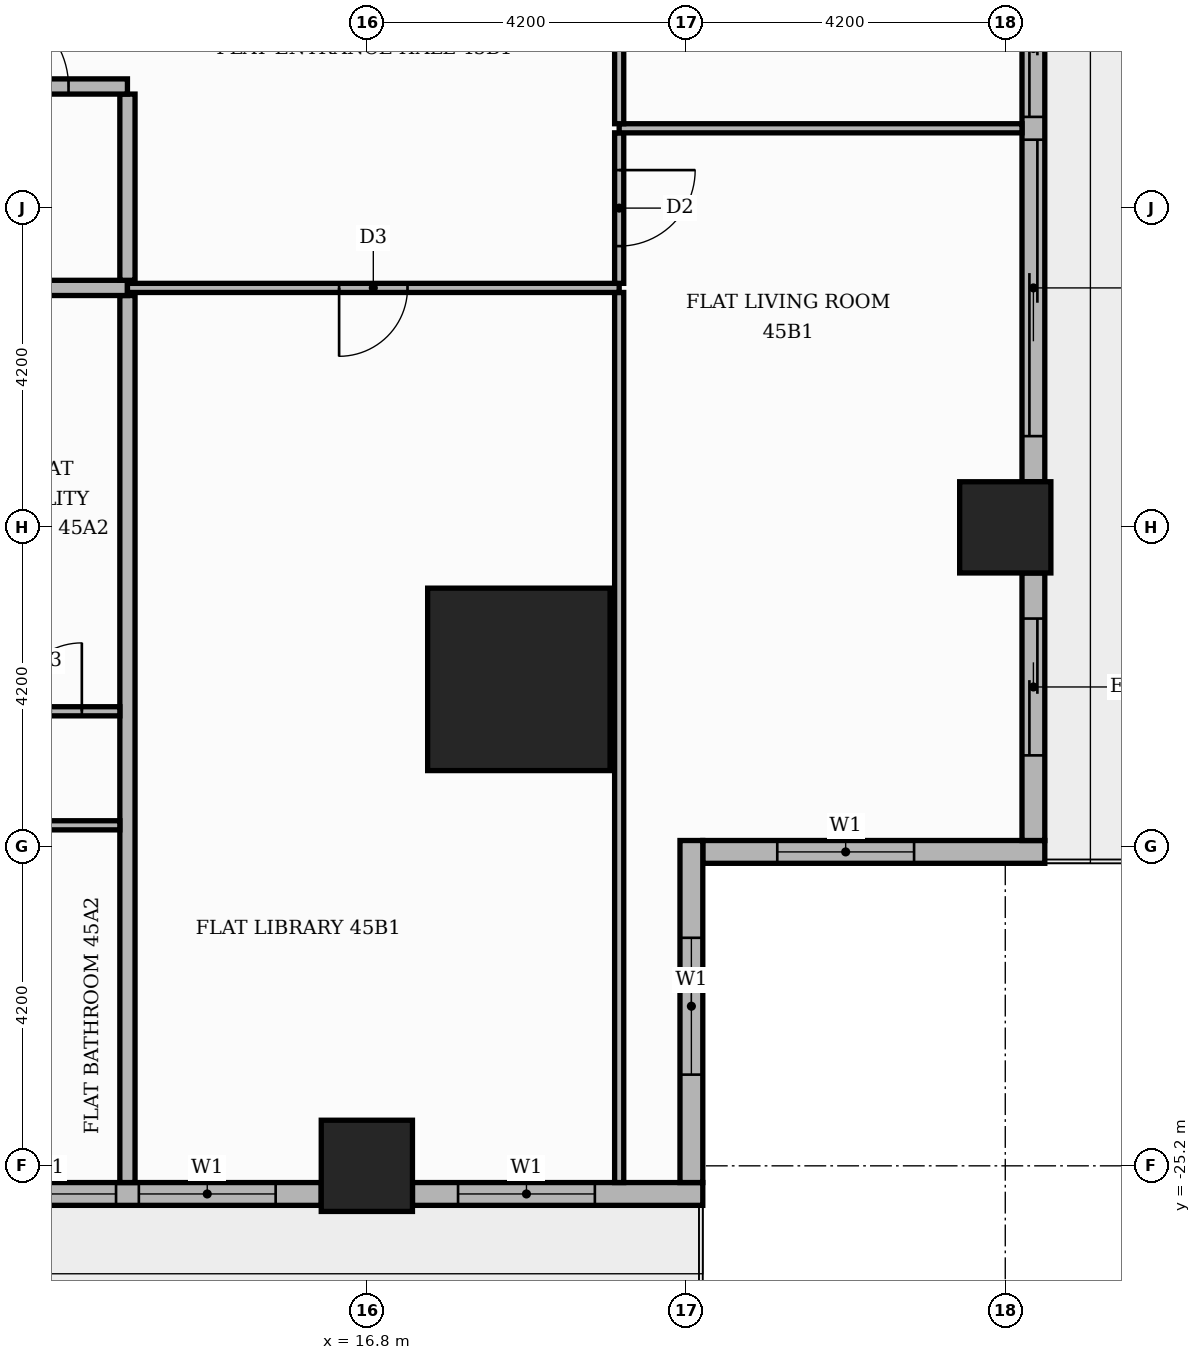
"""IFC4 building model, lengths in metres.
Left out: names, types, materials, properties, quantities, classifications, styles, units other than length and angle.
Written with IfcOpenShell. Run it as: python <this file> out.ifc"""

import sys

from ifc_helpers import new_model, si_unit, direction, frame, frame_2d, origin, origin_2d, place, context, subcontext, project, spatial, rectangle, extrude, element, fill, save


model = new_model("IFC4")
c1 = context("Model", 3, precision=1e-05, world=origin(), true_north=direction((0.0, 1.0)))
c2 = subcontext(c1, "Body", "Model", "MODEL_VIEW")
j1 = project(units=[si_unit("LENGTHUNIT", "METRE"), si_unit("PLANEANGLEUNIT", "RADIAN")], contexts=[c1])
p1 = place(None, origin())
s1 = spatial("IfcSite", under=j1, at=p1, CompositionType="ELEMENT")
p2 = place(p1, origin())
s2 = spatial("IfcBuilding", under=s1, at=p2, CompositionType="ELEMENT")
p3 = place(p2, frame((0.0, 0.0, 192.3)))
s3 = spatial("IfcBuildingStorey", under=s2, at=p3, CompositionType="ELEMENT", Elevation=192.3)
p4 = place(p3, frame((18.8, -18.8, 0.0), z_axis=(0.0, 0.0, 1.0), x_axis=(1.0, 0.0, 0.0)))
e1 = element("IfcColumn", 1, at=p4, inside=s3, PredefinedType="COLUMN", context=c2, shape_type="SweptSolid", body=[
    extrude(rectangle(XDim=2.4, YDim=2.4, at=origin_2d()), origin(), (0.0, 0.0, 1.0), 3.9),
])
for number, where, z_axis, x_axis in (
    (2, (25.2, -16.8, 0.0), (0.0, 0.0, 1.0), (1.0, 0.0, 0.0)),
    (3, (16.8, -25.2, 0.0), (0.0, 0.0, 1.0), (1.0, 0.0, 0.0)),
):
    element("IfcColumn", number, at=place(p3, frame(where, z_axis=z_axis, x_axis=x_axis)), inside=s3, PredefinedType="COLUMN", context=c2, shape_type="SweptSolid", body=[
        extrude(rectangle(XDim=1.2, YDim=1.2, at=origin_2d()), origin(), (0.0, 0.0, 1.0), 3.9),
    ])
p5 = place(p3, frame((21.22, -21.07, 0.0), z_axis=(0.0, 0.0, 1.0), x_axis=(1.0, 0.0, 0.0)))
e4 = element("IfcWall", 4, at=p5, inside=s3, PredefinedType="STANDARD", context=c2, shape_type="SweptSolid", body=[
    extrude(rectangle(XDim=4.5, YDim=0.3, at=frame_2d((2.25, 0.0))), origin(), (0.0, 0.0, 1.0), 3.48),
])
p6 = place(p5, frame((0.98, 0.0, 0.9)))
e5 = element("IfcOpeningElement", 5, at=p6, cuts=e4, PredefinedType="OPENING", context=c2, shape_type="SweptSolid", body=[
    extrude(rectangle(XDim=1.8, YDim=2.1, at=frame_2d((0.9, 1.05))), frame((0.0, 0.16, 0.0), z_axis=(0.0, -1.0, 0.0), x_axis=(1.0, 0.0, 0.0)), (0.0, 0.0, 1.0), 0.32),
])
p7 = place(p3, frame((25.57, -20.92, 0.0), z_axis=(0.0, 0.0, 1.0), x_axis=(0.0, 1.0, 0.0)))
e6 = element("IfcWall", 6, at=p7, inside=s3, PredefinedType="STANDARD", context=c2, shape_type="SweptSolid", body=[
    extrude(rectangle(XDim=3.52, YDim=0.3, at=frame_2d((1.76, 0.0))), origin(), (0.0, 0.0, 1.0), 3.48),
])
p8 = place(p7, frame((1.12, 0.0, 0.0)))
e7 = element("IfcOpeningElement", 7, at=p8, cuts=e6, PredefinedType="OPENING", context=c2, shape_type="SweptSolid", body=[
    extrude(rectangle(XDim=1.8, YDim=2.4, at=frame_2d((0.9, 1.2))), frame((0.0, 0.16, 0.0), z_axis=(0.0, -1.0, 0.0), x_axis=(1.0, 0.0, 0.0)), (0.0, 0.0, 1.0), 0.32),
])
p9 = place(p3, frame((25.57, -16.2, 0.0), z_axis=(0.0, 0.0, 1.0), x_axis=(0.0, 1.0, 0.0)))
e8 = element("IfcWall", 8, at=p9, inside=s3, PredefinedType="STANDARD", context=c2, shape_type="SweptSolid", body=[
    extrude(rectangle(XDim=7.2, YDim=0.3, at=frame_2d((3.6, 0.0))), origin(), (0.0, 0.0, 1.0), 3.48),
])
p10 = place(p9, frame((0.6, 0.0, 0.0)))
e9 = element("IfcOpeningElement", 9, at=p10, cuts=e8, PredefinedType="OPENING", context=c2, shape_type="SweptSolid", body=[
    extrude(rectangle(XDim=3.9, YDim=2.4, at=frame_2d((1.95, 1.2))), frame((0.0, 0.16, 0.0), z_axis=(0.0, -1.0, 0.0), x_axis=(1.0, 0.0, 0.0)), (0.0, 0.0, 1.0), 0.32),
])
p11 = place(p9, frame((4.8, 0.0, 0.0)))
e10 = element("IfcOpeningElement", 10, at=p11, cuts=e8, PredefinedType="OPENING", context=c2, shape_type="SweptSolid", body=[
    extrude(rectangle(XDim=1.8, YDim=2.4, at=frame_2d((0.9, 1.2))), frame((0.0, 0.16, 0.0), z_axis=(0.0, -1.0, 0.0), x_axis=(1.0, 0.0, 0.0)), (0.0, 0.0, 1.0), 0.32),
])
p12 = place(p3, frame((9.0, -25.57, 0.0), z_axis=(0.0, 0.0, 1.0), x_axis=(1.0, 0.0, 0.0)))
e11 = element("IfcWall", 11, at=p12, inside=s3, PredefinedType="STANDARD", context=c2, shape_type="SweptSolid", body=[
    extrude(rectangle(XDim=7.2, YDim=0.3, at=frame_2d((3.6, 0.0))), origin(), (0.0, 0.0, 1.0), 3.48),
])
p13 = place(p12, frame((0.6, 0.0, 0.9)))
e12 = element("IfcOpeningElement", 12, at=p13, cuts=e11, PredefinedType="OPENING", context=c2, shape_type="SweptSolid", body=[
    extrude(rectangle(XDim=1.8, YDim=2.1, at=frame_2d((0.9, 1.05))), frame((0.0, 0.16, 0.0), z_axis=(0.0, -1.0, 0.0), x_axis=(1.0, 0.0, 0.0)), (0.0, 0.0, 1.0), 0.32),
])
p14 = place(p12, frame((2.7, 0.0, 0.9)))
e13 = element("IfcOpeningElement", 13, at=p14, cuts=e11, PredefinedType="OPENING", context=c2, shape_type="SweptSolid", body=[
    extrude(rectangle(XDim=1.8, YDim=2.1, at=frame_2d((0.9, 1.05))), frame((0.0, 0.16, 0.0), z_axis=(0.0, -1.0, 0.0), x_axis=(1.0, 0.0, 0.0)), (0.0, 0.0, 1.0), 0.32),
])
p15 = place(p12, frame((4.8, 0.0, 0.9)))
e14 = element("IfcOpeningElement", 14, at=p15, cuts=e11, PredefinedType="OPENING", context=c2, shape_type="SweptSolid", body=[
    extrude(rectangle(XDim=1.8, YDim=2.1, at=frame_2d((0.9, 1.05))), frame((0.0, 0.16, 0.0), z_axis=(0.0, -1.0, 0.0), x_axis=(1.0, 0.0, 0.0)), (0.0, 0.0, 1.0), 0.32),
])
p16 = place(p3, frame((17.4, -25.57, 0.0), z_axis=(0.0, 0.0, 1.0), x_axis=(1.0, 0.0, 0.0)))
e15 = element("IfcWall", 15, at=p16, inside=s3, PredefinedType="STANDARD", context=c2, shape_type="SweptSolid", body=[
    extrude(rectangle(XDim=3.82, YDim=0.3, at=frame_2d((1.91, 0.0))), origin(), (0.0, 0.0, 1.0), 3.48),
])
p17 = place(p16, frame((0.6, 0.0, 0.9)))
e16 = element("IfcOpeningElement", 16, at=p17, cuts=e15, PredefinedType="OPENING", context=c2, shape_type="SweptSolid", body=[
    extrude(rectangle(XDim=1.8, YDim=2.1, at=frame_2d((0.9, 1.05))), frame((0.0, 0.16, 0.0), z_axis=(0.0, -1.0, 0.0), x_axis=(1.0, 0.0, 0.0)), (0.0, 0.0, 1.0), 0.32),
])
p18 = place(p3, frame((21.07, -25.42, 0.0), z_axis=(0.0, 0.0, 1.0), x_axis=(0.0, 1.0, 0.0)))
e17 = element("IfcWall", 17, at=p18, inside=s3, PredefinedType="STANDARD", context=c2, shape_type="SweptSolid", body=[
    extrude(rectangle(XDim=4.5, YDim=0.3, at=frame_2d((2.25, 0.0))), origin(), (0.0, 0.0, 1.0), 3.48),
])
p19 = place(p18, frame((1.42, 0.0, 0.9)))
e18 = element("IfcOpeningElement", 18, at=p19, cuts=e17, PredefinedType="OPENING", context=c2, shape_type="SweptSolid", body=[
    extrude(rectangle(XDim=1.8, YDim=2.1, at=frame_2d((0.9, 1.05))), frame((0.0, 0.16, 0.0), z_axis=(0.0, -1.0, 0.0), x_axis=(1.0, 0.0, 0.0)), (0.0, 0.0, 1.0), 0.32),
])
p20 = place(p3, frame((13.65, -25.42, 0.0), z_axis=(0.0, 0.0, 1.0), x_axis=(0.0, 1.0, 0.0)))
e19 = element("IfcWall", 19, at=p20, inside=s3, PredefinedType="PARTITIONING", context=c2, shape_type="SweptSolid", body=[
    extrude(rectangle(XDim=11.67, YDim=0.2, at=frame_2d((5.835, 0.0))), origin(), (0.0, 0.0, 1.0), 3.48),
])
p21 = place(p3, frame((20.12, -25.42, 0.0), z_axis=(0.0, 0.0, 1.0), x_axis=(0.0, 1.0, 0.0)))
e20 = element("IfcWall", 20, at=p21, inside=s3, PredefinedType="PARTITIONING", context=c2, shape_type="SweptSolid", body=[
    extrude(rectangle(XDim=11.71, YDim=0.12, at=frame_2d((5.855, 0.0))), origin(), (0.0, 0.0, 1.0), 3.48),
])
p22 = place(p3, frame((-5.15, -20.72, 0.0), z_axis=(0.0, 0.0, 1.0), x_axis=(1.0, 0.0, 0.0)))
e21 = element("IfcWall", 21, at=p22, inside=s3, PredefinedType="PARTITIONING", context=c2, shape_type="SweptSolid", body=[
    extrude(rectangle(XDim=18.7, YDim=0.12, at=frame_2d((9.35, 0.0))), origin(), (0.0, 0.0, 1.0), 3.48),
])
p23 = place(p22, frame((1.5, 0.0, 0.0)))
e22 = element("IfcOpeningElement", 22, at=p23, cuts=e21, PredefinedType="OPENING", context=c2, shape_type="SweptSolid", body=[
    extrude(rectangle(XDim=1.0, YDim=2.1, at=frame_2d((0.5, 1.05))), frame((0.0, 0.07, 0.0), z_axis=(0.0, -1.0, 0.0), x_axis=(1.0, 0.0, 0.0)), (0.0, 0.0, 1.0), 0.14),
])
p24 = place(p22, frame((5.75, 0.0, 0.0)))
e23 = element("IfcOpeningElement", 23, at=p24, cuts=e21, PredefinedType="OPENING", context=c2, shape_type="SweptSolid", body=[
    extrude(rectangle(XDim=0.9, YDim=2.1, at=frame_2d((0.45, 1.05))), frame((0.0, 0.07, 0.0), z_axis=(0.0, -1.0, 0.0), x_axis=(1.0, 0.0, 0.0)), (0.0, 0.0, 1.0), 0.14),
])
p25 = place(p22, frame((14.15, 0.0, 0.0)))
e24 = element("IfcOpeningElement", 24, at=p25, cuts=e21, PredefinedType="OPENING", context=c2, shape_type="SweptSolid", body=[
    extrude(rectangle(XDim=0.9, YDim=2.1, at=frame_2d((0.45, 1.05))), frame((0.0, 0.07, 0.0), z_axis=(0.0, -1.0, 0.0), x_axis=(1.0, 0.0, 0.0)), (0.0, 0.0, 1.0), 0.14),
])
p26 = place(p3, frame((3.15, -19.22, 0.0), z_axis=(0.0, 0.0, 1.0), x_axis=(1.0, 0.0, 0.0)))
e25 = element("IfcWall", 25, at=p26, inside=s3, PredefinedType="PARTITIONING", context=c2, shape_type="SweptSolid", body=[
    extrude(rectangle(XDim=10.4, YDim=0.12, at=frame_2d((5.2, 0.0))), origin(), (0.0, 0.0, 1.0), 3.48),
])
p27 = place(p26, frame((2.7, 0.0, 0.0)))
e26 = element("IfcOpeningElement", 26, at=p27, cuts=e25, PredefinedType="OPENING", context=c2, shape_type="SweptSolid", body=[
    extrude(rectangle(XDim=0.9, YDim=2.1, at=frame_2d((0.45, 1.05))), frame((0.0, 0.07, 0.0), z_axis=(0.0, -1.0, 0.0), x_axis=(1.0, 0.0, 0.0)), (0.0, 0.0, 1.0), 0.14),
])
p28 = place(p26, frame((6.9, 0.0, 0.0)))
e27 = element("IfcOpeningElement", 27, at=p28, cuts=e25, PredefinedType="OPENING", context=c2, shape_type="SweptSolid", body=[
    extrude(rectangle(XDim=0.9, YDim=2.1, at=frame_2d((0.45, 1.05))), frame((0.0, 0.07, 0.0), z_axis=(0.0, -1.0, 0.0), x_axis=(1.0, 0.0, 0.0)), (0.0, 0.0, 1.0), 0.14),
])
p29 = place(p26, frame((9.0, 0.0, 0.0)))
e28 = element("IfcOpeningElement", 28, at=p29, cuts=e25, PredefinedType="OPENING", context=c2, shape_type="SweptSolid", body=[
    extrude(rectangle(XDim=0.9, YDim=2.1, at=frame_2d((0.45, 1.05))), frame((0.0, 0.07, 0.0), z_axis=(0.0, -1.0, 0.0), x_axis=(1.0, 0.0, 0.0)), (0.0, 0.0, 1.0), 0.14),
])
p30 = place(p3, frame((-25.42, -13.65, 0.0), z_axis=(0.0, 0.0, 1.0), x_axis=(1.0, 0.0, 0.0)))
e29 = element("IfcWall", 29, at=p30, inside=s3, PredefinedType="PARTITIONING", context=c2, shape_type="SweptSolid", body=[
    extrude(rectangle(XDim=39.07, YDim=0.2, at=frame_2d((19.535, 0.0))), origin(), (0.0, 0.0, 1.0), 3.48),
])
p31 = place(p30, frame((13.32, 0.0, 0.0)))
e30 = element("IfcOpeningElement", 30, at=p31, cuts=e29, PredefinedType="OPENING", context=c2, shape_type="SweptSolid", body=[
    extrude(rectangle(XDim=1.1, YDim=2.4, at=frame_2d((0.55, 1.2))), frame((0.0, 0.11, 0.0), z_axis=(0.0, -1.0, 0.0), x_axis=(1.0, 0.0, 0.0)), (0.0, 0.0, 1.0), 0.22),
])
p32 = place(p30, frame((25.92, 0.0, 0.0)))
e31 = element("IfcOpeningElement", 31, at=p32, cuts=e29, PredefinedType="OPENING", context=c2, shape_type="SweptSolid", body=[
    extrude(rectangle(XDim=1.1, YDim=2.4, at=frame_2d((0.55, 1.2))), frame((0.0, 0.11, 0.0), z_axis=(0.0, -1.0, 0.0), x_axis=(1.0, 0.0, 0.0)), (0.0, 0.0, 1.0), 0.22),
])
p33 = place(p3, frame((13.65, -13.65, 0.0), z_axis=(0.0, 0.0, 1.0), x_axis=(1.0, 0.0, 0.0)))
e32 = element("IfcWall", 32, at=p33, inside=s3, PredefinedType="PARTITIONING", context=c2, shape_type="SweptSolid", body=[
    extrude(rectangle(XDim=6.47, YDim=0.12, at=frame_2d((3.235, 0.0))), origin(), (0.0, 0.0, 1.0), 3.48),
])
p34 = place(p33, frame((2.785, 0.0, 0.0)))
e33 = element("IfcOpeningElement", 33, at=p34, cuts=e32, PredefinedType="OPENING", context=c2, shape_type="SweptSolid", body=[
    extrude(rectangle(XDim=0.9, YDim=2.1, at=frame_2d((0.45, 1.05))), frame((0.0, 0.07, 0.0), z_axis=(0.0, -1.0, 0.0), x_axis=(1.0, 0.0, 0.0)), (0.0, 0.0, 1.0), 0.14),
])
p35 = place(p3, frame((20.12, -13.59, 0.0), z_axis=(0.0, 0.0, 1.0), x_axis=(0.0, 1.0, 0.0)))
e34 = element("IfcWall", 34, at=p35, inside=s3, PredefinedType="PARTITIONING", context=c2, shape_type="SweptSolid", body=[
    extrude(rectangle(XDim=1.98, YDim=0.12, at=frame_2d((0.99, 0.0))), origin(), (0.0, 0.0, 1.0), 3.48),
])
p36 = place(p35, frame((0.49, 0.0, 0.0)))
e35 = element("IfcOpeningElement", 35, at=p36, cuts=e34, PredefinedType="OPENING", context=c2, shape_type="SweptSolid", body=[
    extrude(rectangle(XDim=1.0, YDim=2.1, at=frame_2d((0.5, 1.05))), frame((0.0, 0.07, 0.0), z_axis=(0.0, -1.0, 0.0), x_axis=(1.0, 0.0, 0.0)), (0.0, 0.0, 1.0), 0.14),
])
p37 = place(p3, frame((13.65, -13.55, 0.0), z_axis=(0.0, 0.0, 1.0), x_axis=(0.0, 1.0, 0.0)))
e36 = element("IfcWall", 36, at=p37, inside=s3, PredefinedType="PARTITIONING", context=c2, shape_type="SweptSolid", body=[
    extrude(rectangle(XDim=2.45, YDim=0.2, at=frame_2d((1.225, 0.0))), origin(), (0.0, 0.0, 1.0), 3.48),
])
p38 = place(p3, frame((20.12, -11.55, 0.0), z_axis=(0.0, 0.0, 1.0), x_axis=(1.0, 0.0, 0.0)))
e37 = element("IfcWall", 37, at=p38, inside=s3, PredefinedType="PARTITIONING", context=c2, shape_type="SweptSolid", body=[
    extrude(rectangle(XDim=5.3, YDim=0.12, at=frame_2d((2.65, 0.0))), origin(), (0.0, 0.0, 1.0), 3.48),
])
p39 = place(p3, frame((20.12, -11.49, 0.0), z_axis=(0.0, 0.0, 1.0), x_axis=(0.0, 1.0, 0.0)))
e38 = element("IfcWall", 38, at=p39, inside=s3, PredefinedType="PARTITIONING", context=c2, shape_type="SweptSolid", body=[
    extrude(rectangle(XDim=4.08, YDim=0.12, at=frame_2d((2.04, 0.0))), origin(), (0.0, 0.0, 1.0), 3.48),
])
p40 = place(p39, frame((1.59, 0.0, 0.0)))
e39 = element("IfcOpeningElement", 39, at=p40, cuts=e38, PredefinedType="OPENING", context=c2, shape_type="SweptSolid", body=[
    extrude(rectangle(XDim=0.9, YDim=2.1, at=frame_2d((0.45, 1.05))), frame((0.0, 0.07, 0.0), z_axis=(0.0, -1.0, 0.0), x_axis=(1.0, 0.0, 0.0)), (0.0, 0.0, 1.0), 0.14),
])
p41 = place(p3, frame((11.0, -11.0, 0.0), z_axis=(0.0, 0.0, 1.0), x_axis=(1.0, 0.0, 0.0)))
e40 = element("IfcWall", 40, at=p41, inside=s3, PredefinedType="PARTITIONING", context=c2, shape_type="SweptSolid", body=[
    extrude(rectangle(XDim=2.65, YDim=0.2, at=frame_2d((1.325, 0.0))), origin(), (0.0, 0.0, 1.0), 3.48),
])
p42 = place(p41, frame((0.775, 0.0, 0.0)))
e41 = element("IfcOpeningElement", 41, at=p42, cuts=e40, PredefinedType="OPENING", context=c2, shape_type="SweptSolid", body=[
    extrude(rectangle(XDim=1.1, YDim=2.4, at=frame_2d((0.55, 1.2))), frame((0.0, 0.11, 0.0), z_axis=(0.0, -1.0, 0.0), x_axis=(1.0, 0.0, 0.0)), (0.0, 0.0, 1.0), 0.22),
])
p43 = place(p6, origin())
e42 = element("IfcWindow", 42, at=p43, inside=s3, PartitioningType="SINGLE_PANEL", PredefinedType="WINDOW", context=c2, shape_type="SweptSolid", body=[
    extrude(rectangle(XDim=1.8, YDim=2.1, at=frame_2d((0.9, 1.05))), frame((0.0, 0.03, 0.0), z_axis=(0.0, -1.0, 0.0), x_axis=(1.0, 0.0, 0.0)), (0.0, 0.0, 1.0), 0.06),
])
fill(e5, e42)
p44 = place(p8, origin())
e43 = element("IfcDoor", 43, at=p44, inside=s3, OperationType="SLIDING_TO_RIGHT", PredefinedType="DOOR", context=c2, shape_type="SweptSolid", body=[
    extrude(rectangle(XDim=1.8, YDim=2.4, at=frame_2d((0.9, 1.2))), frame((0.0, 0.025, 0.0), z_axis=(0.0, -1.0, 0.0), x_axis=(1.0, 0.0, 0.0)), (0.0, 0.0, 1.0), 0.05),
])
fill(e7, e43)
p45 = place(p10, origin())
e44 = element("IfcDoor", 44, at=p45, inside=s3, OperationType="SLIDING_TO_LEFT", PredefinedType="DOOR", context=c2, shape_type="SweptSolid", body=[
    extrude(rectangle(XDim=3.9, YDim=2.4, at=frame_2d((1.95, 1.2))), frame((0.0, 0.025, 0.0), z_axis=(0.0, -1.0, 0.0), x_axis=(1.0, 0.0, 0.0)), (0.0, 0.0, 1.0), 0.05),
])
fill(e9, e44)
p46 = place(p11, origin())
e45 = element("IfcDoor", 45, at=p46, inside=s3, OperationType="SLIDING_TO_RIGHT", PredefinedType="DOOR", context=c2, shape_type="SweptSolid", body=[
    extrude(rectangle(XDim=1.8, YDim=2.4, at=frame_2d((0.9, 1.2))), frame((0.0, 0.025, 0.0), z_axis=(0.0, -1.0, 0.0), x_axis=(1.0, 0.0, 0.0)), (0.0, 0.0, 1.0), 0.05),
])
fill(e10, e45)
p47 = place(p14, origin())
e46 = element("IfcWindow", 46, at=p47, inside=s3, PartitioningType="SINGLE_PANEL", PredefinedType="WINDOW", context=c2, shape_type="SweptSolid", body=[
    extrude(rectangle(XDim=1.8, YDim=2.1, at=frame_2d((0.9, 1.05))), frame((0.0, 0.03, 0.0), z_axis=(0.0, -1.0, 0.0), x_axis=(1.0, 0.0, 0.0)), (0.0, 0.0, 1.0), 0.06),
])
fill(e13, e46)
p48 = place(p15, origin())
e47 = element("IfcWindow", 47, at=p48, inside=s3, PartitioningType="SINGLE_PANEL", PredefinedType="WINDOW", context=c2, shape_type="SweptSolid", body=[
    extrude(rectangle(XDim=1.8, YDim=2.1, at=frame_2d((0.9, 1.05))), frame((0.0, 0.03, 0.0), z_axis=(0.0, -1.0, 0.0), x_axis=(1.0, 0.0, 0.0)), (0.0, 0.0, 1.0), 0.06),
])
fill(e14, e47)
p49 = place(p17, origin())
e48 = element("IfcWindow", 48, at=p49, inside=s3, PartitioningType="SINGLE_PANEL", PredefinedType="WINDOW", context=c2, shape_type="SweptSolid", body=[
    extrude(rectangle(XDim=1.8, YDim=2.1, at=frame_2d((0.9, 1.05))), frame((0.0, 0.03, 0.0), z_axis=(0.0, -1.0, 0.0), x_axis=(1.0, 0.0, 0.0)), (0.0, 0.0, 1.0), 0.06),
])
fill(e16, e48)
p50 = place(p19, origin())
e49 = element("IfcWindow", 49, at=p50, inside=s3, PartitioningType="SINGLE_PANEL", PredefinedType="WINDOW", context=c2, shape_type="SweptSolid", body=[
    extrude(rectangle(XDim=1.8, YDim=2.1, at=frame_2d((0.9, 1.05))), frame((0.0, 0.03, 0.0), z_axis=(0.0, -1.0, 0.0), x_axis=(1.0, 0.0, 0.0)), (0.0, 0.0, 1.0), 0.06),
])
fill(e18, e49)
p51 = place(p29, origin())
e50 = element("IfcDoor", 50, at=p51, inside=s3, OperationType="SINGLE_SWING_RIGHT", PredefinedType="DOOR", context=c2, shape_type="SweptSolid", body=[
    extrude(rectangle(XDim=0.9, YDim=2.1, at=frame_2d((0.45, 1.05))), frame((0.0, 0.025, 0.0), z_axis=(0.0, -1.0, 0.0), x_axis=(1.0, 0.0, 0.0)), (0.0, 0.0, 1.0), 0.05),
])
fill(e28, e50)
p52 = place(p42, origin())
e51 = element("IfcDoor", 51, at=p52, inside=s3, OperationType="SINGLE_SWING_LEFT", PredefinedType="DOOR", context=c2, shape_type="SweptSolid", body=[
    extrude(rectangle(XDim=1.1, YDim=2.4, at=frame_2d((0.55, 1.2))), frame((0.0, 0.025, 0.0), z_axis=(0.0, -1.0, 0.0), x_axis=(1.0, 0.0, 0.0)), (0.0, 0.0, 1.0), 0.05),
])
fill(e41, e51)
p53 = place(p34, frame((0.9, 0.0, 0.0), z_axis=(0.0, 0.0, 1.0), x_axis=(-1.0, 0.0, 0.0)))
e52 = element("IfcDoor", 52, at=p53, inside=s3, OperationType="SINGLE_SWING_LEFT", PredefinedType="DOOR", context=c2, shape_type="SweptSolid", body=[
    extrude(rectangle(XDim=0.9, YDim=2.1, at=frame_2d((0.45, 1.05))), frame((0.0, 0.025, 0.0), z_axis=(0.0, -1.0, 0.0), x_axis=(1.0, 0.0, 0.0)), (0.0, 0.0, 1.0), 0.05),
])
fill(e33, e52)
p54 = place(p36, frame((1.0, 0.0, 0.0), z_axis=(0.0, 0.0, 1.0), x_axis=(-1.0, 0.0, 0.0)))
e53 = element("IfcDoor", 53, at=p54, inside=s3, OperationType="SINGLE_SWING_RIGHT", PredefinedType="DOOR", context=c2, shape_type="SweptSolid", body=[
    extrude(rectangle(XDim=1.0, YDim=2.1, at=frame_2d((0.5, 1.05))), frame((0.0, 0.025, 0.0), z_axis=(0.0, -1.0, 0.0), x_axis=(1.0, 0.0, 0.0)), (0.0, 0.0, 1.0), 0.05),
])
fill(e35, e53)
save(model, sys.argv[1])
